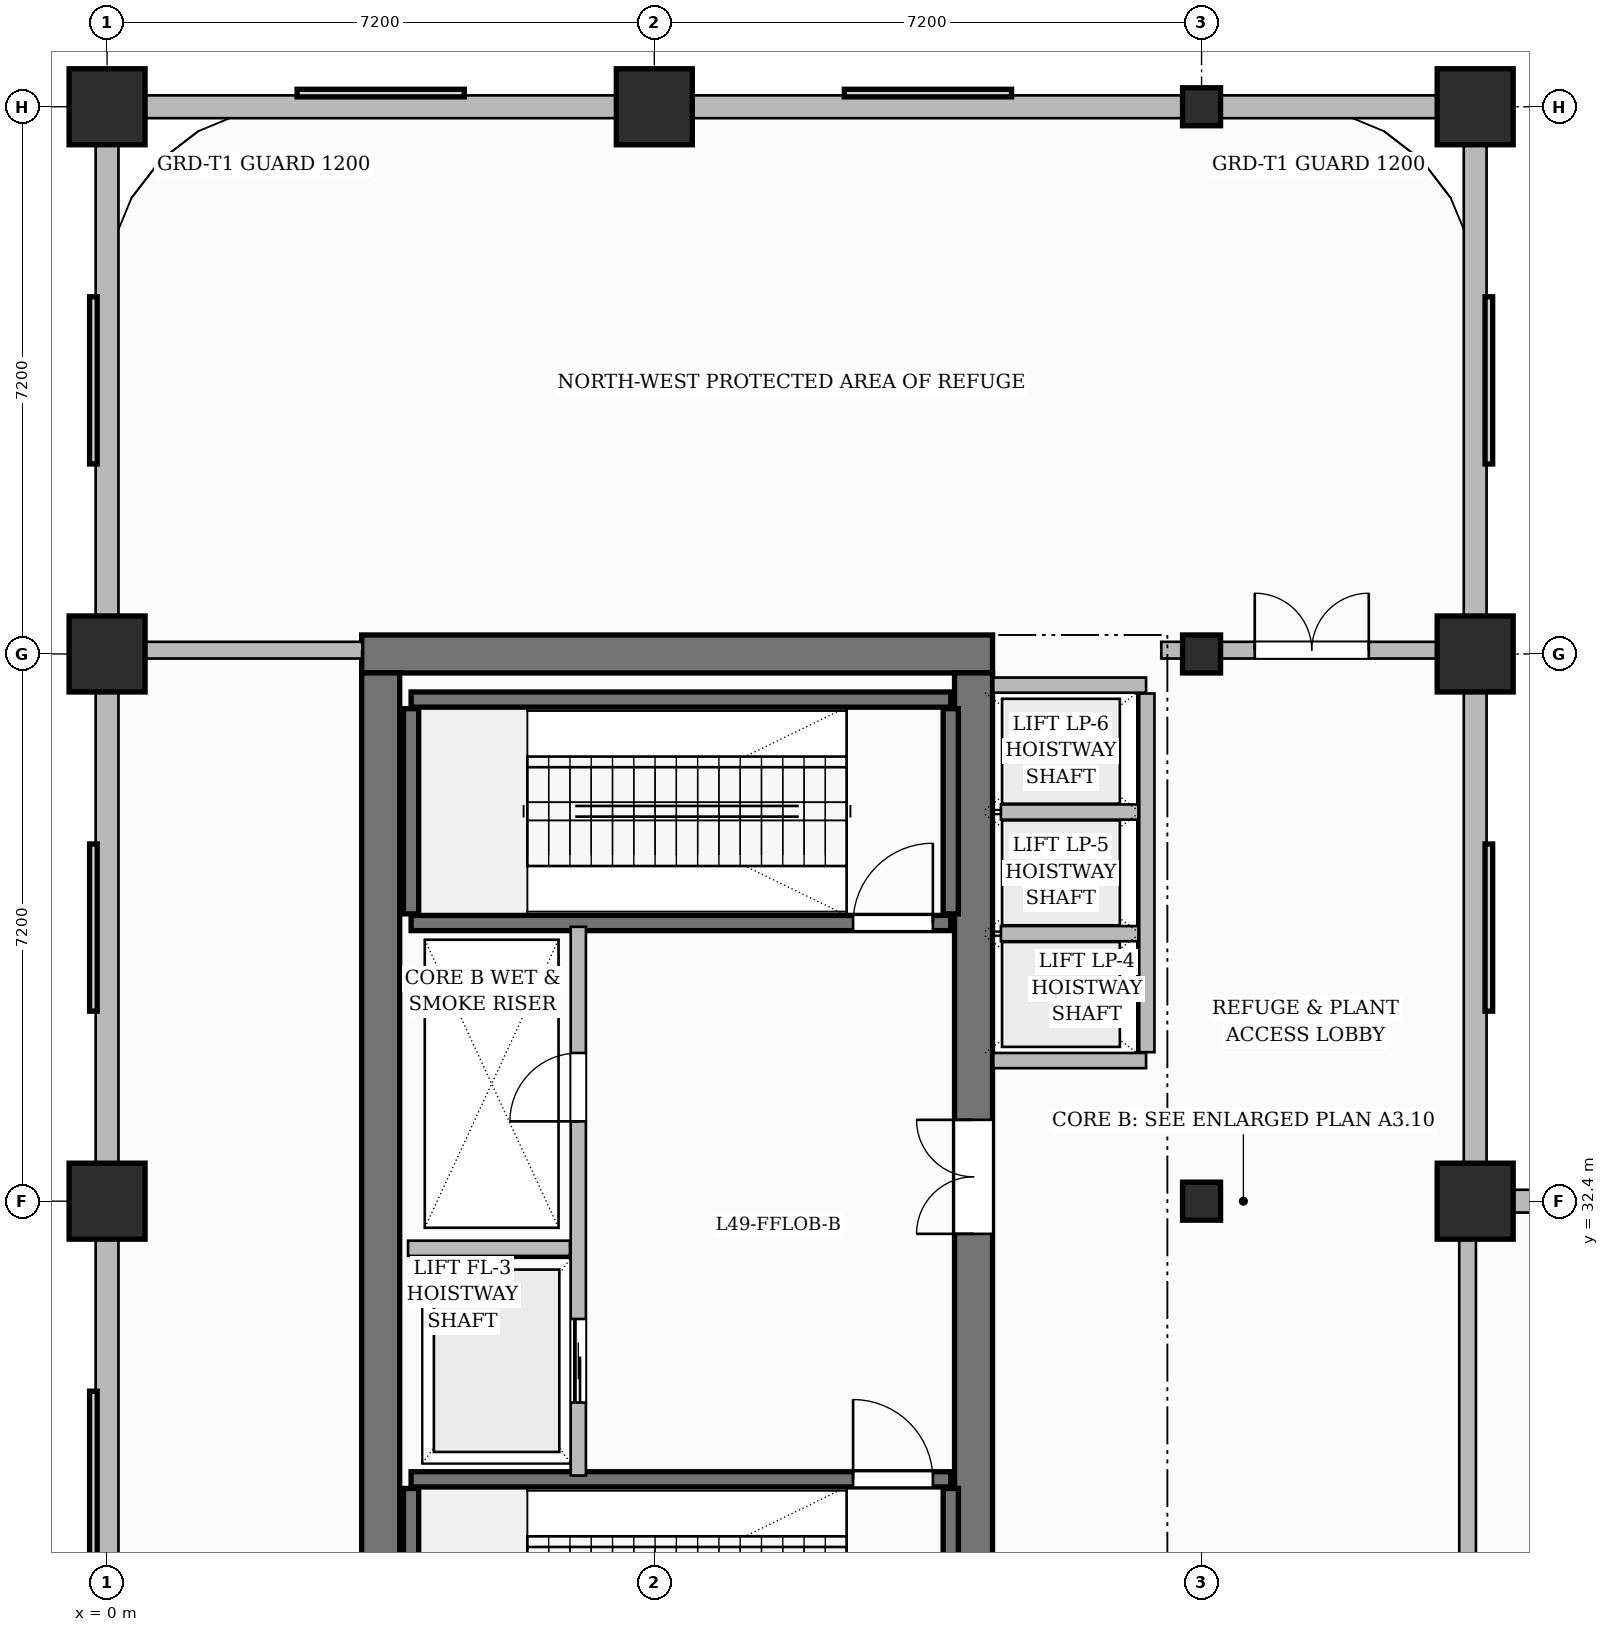
"""IFC4 building model, lengths in metres.
Left out: names, types, materials, properties, quantities, classifications, styles, units other than length and angle.
Written with IfcOpenShell. Run it as: python <this file> out.ifc"""

import sys

from ifc_helpers import new_model, si_unit, direction, frame, frame_2d, origin, origin_2d, place, context, subcontext, project, spatial, rectangle, hollow_rectangle, extrude, source, transform, mapped, element, fill, save


model = new_model("IFC4")
c1 = context("Model", 3, precision=1e-05, world=origin(), true_north=direction((0.0, 1.0)))
c2 = subcontext(c1, "Body", "Model", "MODEL_VIEW")
j1 = project(units=[si_unit("LENGTHUNIT", "METRE"), si_unit("PLANEANGLEUNIT", "RADIAN")], contexts=[c1])
p1 = place(None, origin())
s1 = spatial("IfcSite", under=j1, at=p1, CompositionType="ELEMENT")
p2 = place(p1, origin())
s2 = spatial("IfcBuilding", under=s1, at=p2, CompositionType="ELEMENT")
p3 = place(p2, frame((0.0, 0.0, 196.5)))
s3 = spatial("IfcBuildingStorey", under=s2, at=p3, CompositionType="ELEMENT", Elevation=196.5)
p4 = place(p3, frame((3.35, 39.6, 0.0), z_axis=(0.0, 0.0, 1.0), x_axis=(1.0, 0.0, 0.0)))
e1 = element("IfcWall", 1, at=p4, inside=s3, PredefinedType="SHEAR", context=c2, shape_type="SweptSolid", body=[
    extrude(rectangle(XDim=8.3, YDim=0.5, at=frame_2d((4.15, 0.0))), origin(), (0.0, 0.0, 1.0), 5.4),
])
p5 = place(p3, frame((3.6, 25.45, 0.0), z_axis=(0.0, 0.0, 1.0), x_axis=(0.0, 1.0, 0.0)))
e2 = element("IfcWall", 2, at=p5, inside=s3, PredefinedType="SHEAR", context=c2, shape_type="SweptSolid", body=[
    extrude(rectangle(XDim=13.9, YDim=0.5, at=frame_2d((6.95, 0.0))), origin(), (0.0, 0.0, 1.0), 5.4),
])
p6 = place(p3, frame((11.4, 25.45, 0.0), z_axis=(0.0, 0.0, 1.0), x_axis=(0.0, 1.0, 0.0)))
e3 = element("IfcWall", 3, at=p6, inside=s3, PredefinedType="SHEAR", context=c2, shape_type="SweptSolid", body=[
    extrude(rectangle(XDim=13.9, YDim=0.5, at=frame_2d((6.95, 0.0))), origin(), (0.0, 0.0, 1.0), 5.4),
])
p7 = place(p6, frame((6.52, 0.0, 0.0)))
e4 = element("IfcOpeningElement", 4, at=p7, cuts=e3, PredefinedType="OPENING", context=c2, shape_type="SweptSolid", body=[
    extrude(rectangle(XDim=1.5, YDim=2.2, at=frame_2d((0.75, 1.1))), frame((0.0, 0.26, 0.0), z_axis=(0.0, -1.0, 0.0), x_axis=(1.0, 0.0, 0.0)), (0.0, 0.0, 1.0), 0.52),
])
m1 = source(origin(), c2, "Body", "SweptSolid", [
    extrude(rectangle(XDim=1.0, YDim=1.0, at=origin_2d()), origin(), (0.0, 0.0, 1.0), 5.4),
])
for number, where, z_axis, x_axis in (
    (5, (0.0, 32.4, 0.0), (0.0, 0.0, 1.0), (1.0, 0.0, 0.0)),
    (6, (0.0, 39.6, 0.0), (0.0, 0.0, 1.0), (1.0, 0.0, 0.0)),
    (7, (0.0, 46.8, 0.0), (0.0, 0.0, 1.0), (1.0, 0.0, 0.0)),
    (8, (7.2, 46.8, 0.0), (0.0, 0.0, 1.0), (1.0, 0.0, 0.0)),
):
    element("IfcColumn", number, at=place(p3, frame(where, z_axis=z_axis, x_axis=x_axis)), inside=s3, PredefinedType="COLUMN", context=c2, shape_type="MappedRepresentation", body=[
        mapped(m1, transform((0.0, 0.0, 0.0), scale=1.0)),
    ])
m2 = source(origin(), c2, "Body", "SweptSolid", [
    extrude(hollow_rectangle(XDim=0.5, YDim=0.5, WallThickness=0.03, InnerFilletRadius=0.03, OuterFilletRadius=0.06, at=origin_2d()), origin(), (0.0, 0.0, 1.0), 5.4),
])
for number, where, z_axis, x_axis in (
    (9, (14.4, 32.4, 0.0), (0.0, 0.0, 1.0), (1.0, 0.0, 0.0)),
    (10, (14.4, 39.6, 0.0), (0.0, 0.0, 1.0), (1.0, 0.0, 0.0)),
    (11, (14.4, 46.8, 0.0), (0.0, 0.0, 1.0), (1.0, 0.0, 0.0)),
):
    element("IfcColumn", number, at=place(p3, frame(where, z_axis=z_axis, x_axis=x_axis)), inside=s3, PredefinedType="COLUMN", context=c2, shape_type="MappedRepresentation", body=[
        mapped(m2, transform((0.0, 0.0, 0.0), scale=1.0)),
    ])
for number, where, z_axis, x_axis in (
    (12, (18.0, 32.4, 0.0), (0.0, 0.0, 1.0), (1.0, 0.0, 0.0)),
    (13, (18.0, 39.6, 0.0), (0.0, 0.0, 1.0), (1.0, 0.0, 0.0)),
    (14, (18.0, 46.8, 0.0), (0.0, 0.0, 1.0), (1.0, 0.0, 0.0)),
):
    element("IfcColumn", number, at=place(p3, frame(where, z_axis=z_axis, x_axis=x_axis)), inside=s3, PredefinedType="COLUMN", context=c2, shape_type="MappedRepresentation", body=[
        mapped(m1, transform((0.0, 0.0, 0.0), scale=1.0)),
    ])
for number, where, z_axis, x_axis in (
    (15, (4.0, 25.92, 0.0), (0.0, 0.0, 1.0), (0.0, 1.0, 0.0)),
    (16, (11.1, 25.92, 0.0), (0.0, 0.0, 1.0), (0.0, 1.0, 0.0)),
):
    element("IfcWall", number, at=place(p3, frame(where, z_axis=z_axis, x_axis=x_axis)), inside=s3, PredefinedType="SHEAR", context=c2, shape_type="SweptSolid", body=[
        extrude(rectangle(XDim=2.7, YDim=0.2, at=frame_2d((1.35, 0.0))), origin(), (0.0, 0.0, 1.0), 5.4),
    ])
p8 = place(p3, frame((4.0, 28.74, 0.0), z_axis=(0.0, 0.0, 1.0), x_axis=(1.0, 0.0, 0.0)))
e17 = element("IfcWall", 17, at=p8, inside=s3, PredefinedType="SHEAR", context=c2, shape_type="SweptSolid", body=[
    extrude(rectangle(XDim=7.1, YDim=0.2, at=frame_2d((3.55, 0.0))), origin(), (0.0, 0.0, 1.0), 5.4),
])
p9 = place(p8, frame((5.815, 0.0, 0.0)))
e18 = element("IfcOpeningElement", 18, at=p9, cuts=e17, PredefinedType="OPENING", context=c2, shape_type="SweptSolid", body=[
    extrude(rectangle(XDim=1.05, YDim=2.2, at=frame_2d((0.525, 1.1))), frame((0.0, 0.11, 0.0), z_axis=(0.0, -1.0, 0.0), x_axis=(1.0, 0.0, 0.0)), (0.0, 0.0, 1.0), 0.22),
])
p10 = place(p3, frame((4.0, 39.0, 0.0), z_axis=(0.0, 0.0, 1.0), x_axis=(1.0, 0.0, 0.0)))
e19 = element("IfcWall", 19, at=p10, inside=s3, PredefinedType="SHEAR", context=c2, shape_type="SweptSolid", body=[
    extrude(rectangle(XDim=7.1, YDim=0.2, at=frame_2d((3.55, 0.0))), origin(), (0.0, 0.0, 1.0), 5.4),
])
for number, where, z_axis, x_axis in (
    (20, (4.0, 36.18, 0.0), (0.0, 0.0, 1.0), (0.0, 1.0, 0.0)),
    (21, (11.1, 36.18, 0.0), (0.0, 0.0, 1.0), (0.0, 1.0, 0.0)),
):
    element("IfcWall", number, at=place(p3, frame(where, z_axis=z_axis, x_axis=x_axis)), inside=s3, PredefinedType="SHEAR", context=c2, shape_type="SweptSolid", body=[
        extrude(rectangle(XDim=2.7, YDim=0.2, at=frame_2d((1.35, 0.0))), origin(), (0.0, 0.0, 1.0), 5.4),
    ])
p11 = place(p3, frame((4.0, 36.06, 0.0), z_axis=(0.0, 0.0, 1.0), x_axis=(1.0, 0.0, 0.0)))
e22 = element("IfcWall", 22, at=p11, inside=s3, PredefinedType="SHEAR", context=c2, shape_type="SweptSolid", body=[
    extrude(rectangle(XDim=7.1, YDim=0.2, at=frame_2d((3.55, 0.0))), origin(), (0.0, 0.0, 1.0), 5.4),
])
p12 = place(p11, frame((5.815, 0.0, 0.0)))
e23 = element("IfcOpeningElement", 23, at=p12, cuts=e22, PredefinedType="OPENING", context=c2, shape_type="SweptSolid", body=[
    extrude(rectangle(XDim=1.05, YDim=2.2, at=frame_2d((0.525, 1.1))), frame((0.0, 0.11, 0.0), z_axis=(0.0, -1.0, 0.0), x_axis=(1.0, 0.0, 0.0)), (0.0, 0.0, 1.0), 0.22),
])
p13 = place(p3, frame((6.2, 28.79, 0.0), z_axis=(0.0, 0.0, 1.0), x_axis=(0.0, 1.0, 0.0)))
e24 = element("IfcWall", 24, at=p13, inside=s3, PredefinedType="PARTITIONING", context=c2, shape_type="SweptSolid", body=[
    extrude(rectangle(XDim=7.22, YDim=0.2, at=frame_2d((3.61, 0.0))), origin(), (0.0, 0.0, 1.0), 5.15),
])
p14 = place(p13, frame((4.66, 0.0, 0.0)))
e25 = element("IfcOpeningElement", 25, at=p14, cuts=e24, PredefinedType="OPENING", context=c2, shape_type="SweptSolid", body=[
    extrude(rectangle(XDim=0.9, YDim=2.1, at=frame_2d((0.45, 1.05))), frame((0.0, 0.11, 0.0), z_axis=(0.0, -1.0, 0.0), x_axis=(1.0, 0.0, 0.0)), (0.0, 0.0, 1.0), 0.22),
])
p15 = place(p13, frame((0.96, 0.0, 0.0)))
e26 = element("IfcOpeningElement", 26, at=p15, cuts=e24, PredefinedType="OPENING", context=c2, shape_type="SweptSolid", body=[
    extrude(rectangle(XDim=1.1, YDim=2.2, at=frame_2d((0.55, 1.1))), frame((0.0, 0.11, 0.0), z_axis=(0.0, -1.0, 0.0), x_axis=(1.0, 0.0, 0.0)), (0.0, 0.0, 1.0), 0.22),
])
p16 = place(p3, frame((3.96, 31.78, 0.0), z_axis=(0.0, 0.0, 1.0), x_axis=(1.0, 0.0, 0.0)))
e27 = element("IfcWall", 27, at=p16, inside=s3, PredefinedType="PARTITIONING", context=c2, shape_type="SweptSolid", body=[
    extrude(rectangle(XDim=2.13, YDim=0.2, at=frame_2d((1.065, 0.0))), origin(), (0.0, 0.0, 1.0), 5.15),
])
for number, where, z_axis, x_axis in (
    (28, (11.66, 34.25, 0.0), (0.0, 0.0, 1.0), (1.0, 0.0, 0.0)),
    (29, (11.66, 39.19, 0.0), (0.0, 0.0, 1.0), (1.0, 0.0, 0.0)),
):
    element("IfcWall", number, at=place(p3, frame(where, z_axis=z_axis, x_axis=x_axis)), inside=s3, PredefinedType="PARTITIONING", context=c2, shape_type="SweptSolid", body=[
        extrude(rectangle(XDim=2.01, YDim=0.2, at=frame_2d((1.005, 0.0))), origin(), (0.0, 0.0, 1.0), 5.15),
    ])
p17 = place(p3, frame((13.68, 34.36, 0.0), z_axis=(0.0, 0.0, 1.0), x_axis=(0.0, 1.0, 0.0)))
e30 = element("IfcWall", 30, at=p17, inside=s3, PredefinedType="PARTITIONING", context=c2, shape_type="SweptSolid", body=[
    extrude(rectangle(XDim=4.72, YDim=0.2, at=frame_2d((2.36, 0.0))), origin(), (0.0, 0.0, 1.0), 5.15),
])
for number, where, z_axis, x_axis in (
    (31, (11.76, 35.92, 0.0), (0.0, 0.0, 1.0), (1.0, 0.0, 0.0)),
    (32, (11.76, 37.52, 0.0), (0.0, 0.0, 1.0), (1.0, 0.0, 0.0)),
):
    element("IfcWall", number, at=place(p3, frame(where, z_axis=z_axis, x_axis=x_axis)), inside=s3, PredefinedType="PARTITIONING", context=c2, shape_type="SweptSolid", body=[
        extrude(rectangle(XDim=1.81, YDim=0.2, at=frame_2d((0.905, 0.0))), origin(), (0.0, 0.0, 1.0), 5.15),
    ])
p18 = place(p3, frame((17.9, 25.29, 0.0), z_axis=(0.0, 0.0, 1.0), x_axis=(0.0, 1.0, 0.0)))
e33 = element("IfcWall", 33, at=p18, inside=s3, PredefinedType="PARTITIONING", context=c2, shape_type="SweptSolid", body=[
    extrude(rectangle(XDim=6.87, YDim=0.22, at=frame_2d((3.435, 0.0))), origin(), (0.0, 0.0, 1.0), 5.15),
])
p19 = place(p3, frame((13.87, 39.65, 0.0), z_axis=(0.0, 0.0, 1.0), x_axis=(1.0, 0.0, 0.0)))
e34 = element("IfcWall", 34, at=p19, inside=s3, PredefinedType="PARTITIONING", context=c2, shape_type="SweptSolid", body=[
    extrude(rectangle(XDim=3.89, YDim=0.22, at=frame_2d((1.945, 0.0))), origin(), (0.0, 0.0, 1.0), 4.485),
])
p20 = place(p19, frame((1.23, 0.0, 0.0)))
e35 = element("IfcOpeningElement", 35, at=p20, cuts=e34, PredefinedType="OPENING", context=c2, shape_type="SweptSolid", body=[
    extrude(rectangle(XDim=1.5, YDim=2.2, at=frame_2d((0.75, 1.1))), frame((0.0, 0.12, 0.0), z_axis=(0.0, -1.0, 0.0), x_axis=(1.0, 0.0, 0.0)), (0.0, 0.0, 1.0), 0.24),
])
p21 = place(p3, frame((0.29, 39.65, 0.0), z_axis=(0.0, 0.0, 1.0), x_axis=(1.0, 0.0, 0.0)))
e36 = element("IfcWall", 36, at=p21, inside=s3, PredefinedType="PARTITIONING", context=c2, shape_type="SweptSolid", body=[
    extrude(rectangle(XDim=3.07, YDim=0.22, at=frame_2d((1.535, 0.0))), origin(), (0.0, 0.0, 1.0), 5.15),
])
p22 = place(p3, frame((0.0, 25.25, 0.0), z_axis=(0.0, 0.0, 1.0), x_axis=(0.0, 1.0, 0.0)))
e37 = element("IfcWall", 37, at=p22, inside=s3, PredefinedType="SOLIDWALL", context=c2, shape_type="SweptSolid", body=[
    extrude(rectangle(XDim=21.5, YDim=0.3, at=frame_2d((10.75, 0.0))), origin(), (0.0, 0.0, 1.0), 4.485),
])
p23 = place(p3, frame((0.0, 46.8, 0.0), z_axis=(0.0, 0.0, 1.0), x_axis=(1.0, 0.0, 0.0)))
e38 = element("IfcWall", 38, at=p23, inside=s3, PredefinedType="SOLIDWALL", context=c2, shape_type="SweptSolid", body=[
    extrude(rectangle(XDim=18.0, YDim=0.3, at=frame_2d((9.0, 0.0))), origin(), (0.0, 0.0, 1.0), 4.485),
])
p24 = place(p3, frame((18.0, 32.4, 0.0), z_axis=(0.0, 0.0, 1.0), x_axis=(0.0, 1.0, 0.0)))
e39 = element("IfcWall", 39, at=p24, inside=s3, PredefinedType="SOLIDWALL", context=c2, shape_type="SweptSolid", body=[
    extrude(rectangle(XDim=14.35, YDim=0.3, at=frame_2d((7.175, 0.0))), origin(), (0.0, 0.0, 1.0), 5.15),
])
p25 = place(p3, frame((18.0, 32.4, 0.0), z_axis=(0.0, 0.0, 1.0), x_axis=(1.0, 0.0, 0.0)))
e40 = element("IfcWall", 40, at=p25, inside=s3, PredefinedType="SOLIDWALL", context=c2, shape_type="SweptSolid", body=[
    extrude(rectangle(XDim=16.8, YDim=0.3, at=frame_2d((8.4, 0.0))), origin(), (0.0, 0.0, 1.0), 4.335),
])
m3 = source(origin(), c2, "Body", "SweptSolid", [
    extrude(rectangle(XDim=1.05, YDim=2.2, at=frame_2d((0.525, 1.1))), frame((0.0, 0.025, 0.0), z_axis=(0.0, -1.0, 0.0), x_axis=(1.0, 0.0, 0.0)), (0.0, 0.0, 1.0), 0.05),
])
p26 = place(p9, origin())
e41 = element("IfcDoor", 41, at=p26, inside=s3, OperationType="SINGLE_SWING_LEFT", PredefinedType="DOOR", context=c2, shape_type="MappedRepresentation", body=[
    mapped(m3, transform((0.0, 0.0, 0.0), scale=1.0)),
])
fill(e18, e41)
p27 = place(p12, origin())
e42 = element("IfcDoor", 42, at=p27, inside=s3, OperationType="SINGLE_SWING_RIGHT", PredefinedType="DOOR", context=c2, shape_type="MappedRepresentation", body=[
    mapped(m3, transform((0.0, 0.0, 0.0), scale=1.0)),
])
fill(e23, e42)
m4 = source(origin(), c2, "Body", "SweptSolid", [
    extrude(rectangle(XDim=0.9, YDim=2.1, at=frame_2d((0.45, 1.05))), frame((0.0, 0.025, 0.0), z_axis=(0.0, -1.0, 0.0), x_axis=(1.0, 0.0, 0.0)), (0.0, 0.0, 1.0), 0.05),
])
p28 = place(p14, origin())
e43 = element("IfcDoor", 43, at=p28, inside=s3, OperationType="SINGLE_SWING_LEFT", PredefinedType="DOOR", context=c2, shape_type="MappedRepresentation", body=[
    mapped(m4, transform((0.0, 0.0, 0.0), scale=1.0)),
])
fill(e25, e43)
m5 = source(origin(), c2, "Body", "SweptSolid", [
    extrude(rectangle(XDim=1.5, YDim=2.2, at=frame_2d((0.75, 1.1))), frame((0.0, 0.025, 0.0), z_axis=(0.0, -1.0, 0.0), x_axis=(1.0, 0.0, 0.0)), (0.0, 0.0, 1.0), 0.05),
])
p29 = place(p7, origin())
e44 = element("IfcDoor", 44, at=p29, inside=s3, OperationType="DOUBLE_DOOR_SINGLE_SWING", PredefinedType="DOOR", context=c2, shape_type="MappedRepresentation", body=[
    mapped(m5, transform((0.0, 0.0, 0.0), scale=1.0)),
])
fill(e4, e44)
p30 = place(p20, origin())
e45 = element("IfcDoor", 45, at=p30, inside=s3, OperationType="DOUBLE_DOOR_SINGLE_SWING", PredefinedType="DOOR", context=c2, shape_type="MappedRepresentation", body=[
    mapped(m5, transform((0.0, 0.0, 0.0), scale=1.0)),
])
fill(e35, e45)
m6 = source(origin(), c2, "Body", "SweptSolid", [
    extrude(rectangle(XDim=1.1, YDim=2.2, at=frame_2d((0.55, 1.1))), frame((0.0, 0.025, 0.0), z_axis=(0.0, -1.0, 0.0), x_axis=(1.0, 0.0, 0.0)), (0.0, 0.0, 1.0), 0.05),
])
p31 = place(p15, origin())
e46 = element("IfcDoor", 46, at=p31, inside=s3, OperationType="SLIDING_TO_LEFT", PredefinedType="DOOR", context=c2, shape_type="MappedRepresentation", body=[
    mapped(m6, transform((0.0, 0.0, 0.0), scale=1.0)),
])
fill(e26, e46)
save(model, sys.argv[1])
